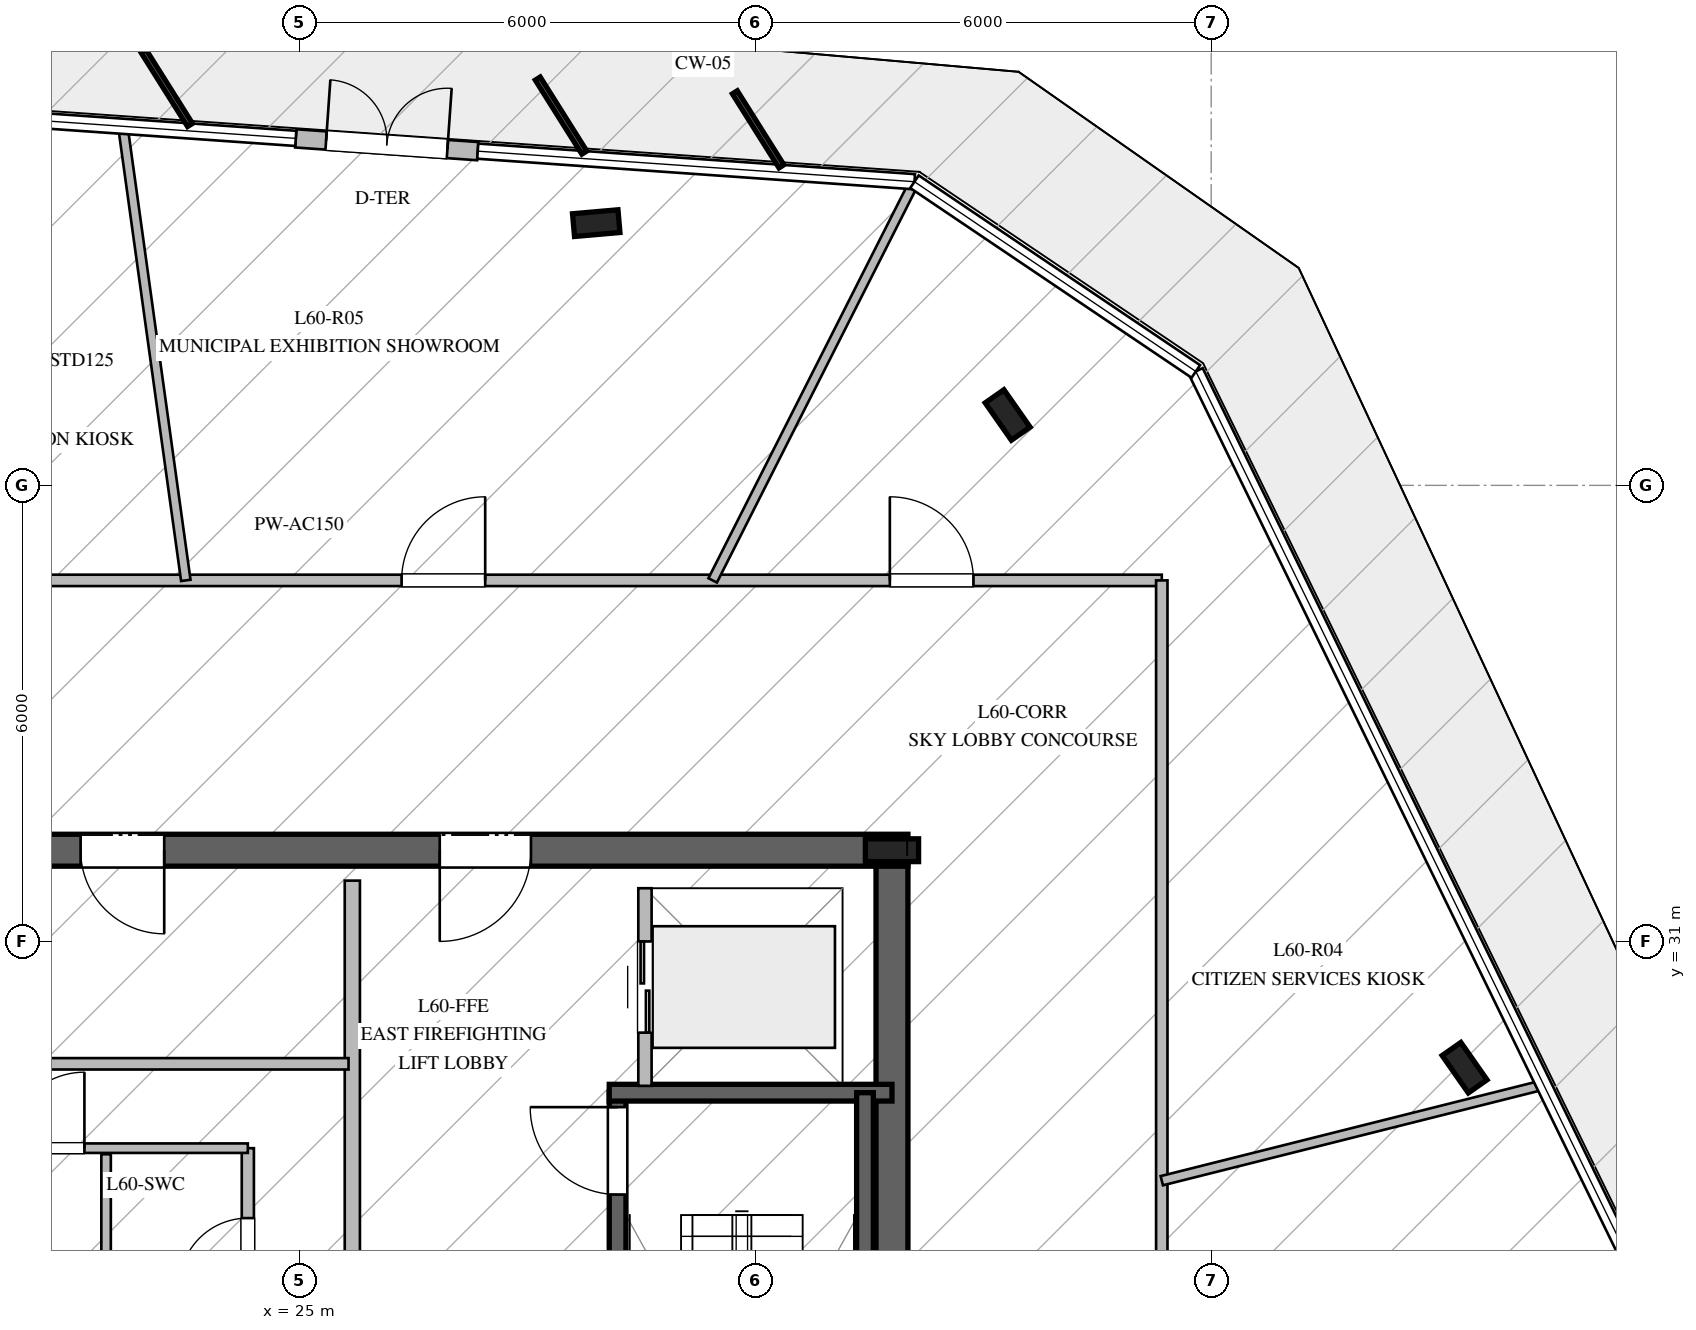
"""IFC4 building model, lengths in metres.
Left out: names, types, materials, properties, quantities, classifications, styles, units other than length and angle.
Written with IfcOpenShell. Run it as: python <this file> out.ifc"""

import sys

from ifc_helpers import new_model, si_unit, direction, frame, frame_2d, origin, origin_2d, place, context, subcontext, project, spatial, rectangle, i_section, extrude, element, fill, save


model = new_model("IFC4")
c1 = context("Model", 3, precision=1e-05, world=origin(), true_north=direction((0.0, 1.0)))
c2 = subcontext(c1, "Body", "Model", "MODEL_VIEW")
j1 = project(units=[si_unit("LENGTHUNIT", "METRE"), si_unit("PLANEANGLEUNIT", "RADIAN")], contexts=[c1])
p1 = place(None, origin())
s1 = spatial("IfcSite", under=j1, at=p1, CompositionType="ELEMENT")
p2 = place(p1, origin())
s2 = spatial("IfcBuilding", under=s1, at=p2, CompositionType="ELEMENT")
p3 = place(p2, frame((0.0, 0.0, 250.2)))
s3 = spatial("IfcBuildingStorey", under=s2, at=p3, CompositionType="ELEMENT", Elevation=250.2)
p4 = place(p3, frame((33.01, 32.2, 0.0), z_axis=(0.0, 0.0, 1.0), x_axis=(-1.0, 0.0, 0.0)))
e1 = element("IfcWall", 1, at=p4, inside=s3, PredefinedType="SHEAR", context=c2, shape_type="SweptSolid", body=[
    extrude(rectangle(XDim=16.02, YDim=0.42, at=frame_2d((8.01, 0.0))), origin(), (0.0, 0.0, 1.0), 3.78),
])
p5 = place(p4, frame((4.96, 0.0, 0.0)))
e2 = element("IfcOpeningElement", 2, at=p5, cuts=e1, PredefinedType="OPENING", context=c2, shape_type="SweptSolid", body=[
    extrude(rectangle(XDim=1.2, YDim=2.25, at=frame_2d((0.6, 1.125))), frame((0.0, 0.22, 0.0), z_axis=(0.0, -1.0, 0.0), x_axis=(1.0, 0.0, 0.0)), (0.0, 0.0, 1.0), 0.44),
])
p6 = place(p4, frame((9.785, 0.0, 0.0)))
e3 = element("IfcOpeningElement", 3, at=p6, cuts=e1, PredefinedType="OPENING", context=c2, shape_type="SweptSolid", body=[
    extrude(rectangle(XDim=1.1, YDim=2.2, at=frame_2d((0.55, 1.1))), frame((0.0, 0.22, 0.0), z_axis=(0.0, -1.0, 0.0), x_axis=(1.0, 0.0, 0.0)), (0.0, 0.0, 1.0), 0.44),
])
p7 = place(p3, frame((32.8, 18.01, 0.0), z_axis=(0.0, 0.0, 1.0), x_axis=(0.0, 1.0, 0.0)))
e4 = element("IfcWall", 4, at=p7, inside=s3, PredefinedType="SHEAR", context=c2, shape_type="SweptSolid", body=[
    extrude(rectangle(XDim=13.98, YDim=0.42, at=frame_2d((6.99, 0.0))), origin(), (0.0, 0.0, 1.0), 3.78),
])
p8 = place(p3, frame((32.8, 32.2, 0.0), z_axis=(0.0, 0.0, 1.0), x_axis=(1.0, 0.0, 0.0)))
e5 = element("IfcColumn", 5, at=p8, inside=s3, PredefinedType="COLUMN", context=c2, shape_type="SweptSolid", body=[
    extrude(i_section(OverallWidth=0.3, OverallDepth=0.7, WebThickness=0.017, FlangeThickness=0.032, at=origin_2d()), origin(), (0.0, 0.0, 1.0), 4.0),
])
p9 = place(p3, frame((29.19, 21.79, 0.0), z_axis=(0.0, 0.0, 1.0), x_axis=(0.0, 1.0, 0.0)))
e6 = element("IfcWall", 6, at=p9, inside=s3, PredefinedType="SOLIDWALL", context=c2, shape_type="SweptSolid", body=[
    extrude(rectangle(XDim=7.22, YDim=0.22, at=frame_2d((3.61, 0.0))), origin(), (0.0, 0.0, 1.0), 3.78),
])
p10 = place(p9, frame((5.88, 0.0, 0.0)))
e7 = element("IfcOpeningElement", 7, at=p10, cuts=e6, PredefinedType="OPENING", context=c2, shape_type="SweptSolid", body=[
    extrude(rectangle(XDim=1.15, YDim=2.2, at=frame_2d((0.575, 1.1))), frame((0.0, 0.12, 0.0), z_axis=(0.0, -1.0, 0.0), x_axis=(1.0, 0.0, 0.0)), (0.0, 0.0, 1.0), 0.24),
])
p11 = place(p3, frame((29.08, 29.01, 0.0), z_axis=(0.0, 0.0, 1.0), x_axis=(1.0, 0.0, 0.0)))
e8 = element("IfcWall", 8, at=p11, inside=s3, PredefinedType="SOLIDWALL", context=c2, shape_type="SweptSolid", body=[
    extrude(rectangle(XDim=3.72, YDim=0.22, at=frame_2d((1.86, 0.0))), origin(), (0.0, 0.0, 1.0), 3.78),
])
p12 = place(p3, frame((32.445, 29.01, 0.0), z_axis=(0.0, 0.0, 1.0), x_axis=(0.0, -1.0, 0.0)))
e9 = element("IfcWall", 9, at=p12, inside=s3, PredefinedType="SOLIDWALL", context=c2, shape_type="SweptSolid", body=[
    extrude(rectangle(XDim=7.22, YDim=0.22, at=frame_2d((3.61, 0.0))), origin(), (0.0, 0.0, 1.0), 3.78),
])
for number, where, z_axis, x_axis in (
    (10, (28.909, 40.45, -0.27), (0.0, 0.0, 1.0), (0.996, 0.087, 0.0)),
    (11, (40.334, 29.339, -0.27), (0.0, 0.0, 1.0), (-0.574, 0.819, 0.0)),
    (12, (34.322, 37.926, -0.27), (0.0, 0.0, 1.0), (-0.574, 0.819, 0.0)),
):
    element("IfcColumn", number, at=place(p3, frame(where, z_axis=z_axis, x_axis=x_axis)), inside=s3, PredefinedType="COLUMN", context=c2, shape_type="SweptSolid", body=[
        extrude(i_section(OverallWidth=0.3, OverallDepth=0.6, WebThickness=0.015, FlangeThickness=0.03, at=origin_2d()), origin(), (0.0, 0.0, 1.0), 4.27),
    ])
p13 = place(p3, frame((27.35, 41.397, 0.0), z_axis=(0.0, 0.0, 1.0), x_axis=(-0.99754775803, 0.069989073784, 0.0)))
e13 = element("IfcWall", 13, at=p13, inside=s3, PredefinedType="STANDARD", context=c2, shape_type="SweptSolid", body=[
    extrude(rectangle(XDim=2.4, YDim=0.24, at=frame_2d((1.2, 0.0))), origin(), (0.0, 0.0, 1.0), 3.78),
])
p14 = place(p13, frame((0.4, 0.0, 0.0)))
e14 = element("IfcOpeningElement", 14, at=p14, cuts=e13, PredefinedType="OPENING", context=c2, shape_type="SweptSolid", body=[
    extrude(rectangle(XDim=1.6, YDim=2.25, at=frame_2d((0.8, 1.125))), frame((0.0, 0.13, 0.0), z_axis=(0.0, -1.0, 0.0), x_axis=(1.0, 0.0, 0.0)), (0.0, 0.0, 1.0), 0.26),
])
p15 = place(p3, frame((25.7, 26.65, 0.0), z_axis=(0.0, 0.0, 1.0), x_axis=(0.0, 1.0, 0.0)))
e15 = element("IfcWall", 15, at=p15, inside=s3, PredefinedType="PARTITIONING", context=c2, shape_type="SweptSolid", body=[
    extrude(rectangle(XDim=5.15, YDim=0.2, at=frame_2d((2.575, 0.0))), origin(), (0.0, 0.0, 1.0), 3.78),
])
p16 = place(p3, frame((24.325, 23.35, 0.0), z_axis=(0.0, 0.0, 1.0), x_axis=(0.0, 1.0, 0.0)))
e16 = element("IfcWall", 16, at=p16, inside=s3, PredefinedType="PLUMBINGWALL", context=c2, shape_type="SweptSolid", body=[
    extrude(rectangle(XDim=4.93, YDim=0.16, at=frame_2d((2.465, 0.0))), origin(), (0.0, 0.0, 1.0), 3.78),
])
p17 = place(p16, frame((0.65, 0.0, 0.0)))
e17 = element("IfcOpeningElement", 17, at=p17, cuts=e16, PredefinedType="OPENING", context=c2, shape_type="SweptSolid", body=[
    extrude(rectangle(XDim=0.95, YDim=2.1, at=frame_2d((0.475, 1.05))), frame((0.0, 0.09, 0.0), z_axis=(0.0, -1.0, 0.0), x_axis=(1.0, 0.0, 0.0)), (0.0, 0.0, 1.0), 0.18),
])
p18 = place(p16, frame((3.11, 0.0, 0.0)))
e18 = element("IfcOpeningElement", 18, at=p18, cuts=e16, PredefinedType="OPENING", context=c2, shape_type="SweptSolid", body=[
    extrude(rectangle(XDim=0.9, YDim=2.1, at=frame_2d((0.45, 1.05))), frame((0.0, 0.09, 0.0), z_axis=(0.0, -1.0, 0.0), x_axis=(1.0, 0.0, 0.0)), (0.0, 0.0, 1.0), 0.18),
])
p19 = place(p3, frame((20.92, 28.28, 0.0), z_axis=(0.0, 0.0, 1.0), x_axis=(1.0, 0.0, 0.0)))
e19 = element("IfcWall", 19, at=p19, inside=s3, PredefinedType="PARTITIONING", context=c2, shape_type="SweptSolid", body=[
    extrude(rectangle(XDim=3.405, YDim=0.125, at=frame_2d((1.703, 0.0))), origin(), (0.0, 0.0, 1.0), 3.78),
])
p20 = place(p19, frame((0.255, 0.0, 0.0)))
e20 = element("IfcOpeningElement", 20, at=p20, cuts=e19, PredefinedType="OPENING", context=c2, shape_type="SweptSolid", body=[
    extrude(rectangle(XDim=1.0, YDim=2.15, at=frame_2d((0.5, 1.075))), frame((0.0, 0.073, 0.0), z_axis=(0.0, -1.0, 0.0), x_axis=(1.0, 0.0, 0.0)), (0.0, 0.0, 1.0), 0.145),
])
p21 = place(p3, frame((22.46, 25.62, 0.0), z_axis=(0.0, 0.0, 1.0), x_axis=(0.0, 1.0, 0.0)))
e21 = element("IfcWall", 21, at=p21, inside=s3, PredefinedType="PARTITIONING", context=c2, shape_type="SweptSolid", body=[
    extrude(rectangle(XDim=2.58, YDim=0.125, at=frame_2d((1.29, 0.0))), origin(), (0.0, 0.0, 1.0), 3.78),
])
p22 = place(p3, frame((19.75, 29.39, 0.0), z_axis=(0.0, 0.0, 1.0), x_axis=(1.0, 0.0, 0.0)))
e22 = element("IfcWall", 22, at=p22, inside=s3, PredefinedType="PARTITIONING", context=c2, shape_type="SweptSolid", body=[
    extrude(rectangle(XDim=5.9, YDim=0.15, at=frame_2d((2.95, 0.0))), origin(), (0.0, 0.0, 1.0), 3.78),
])
p23 = place(p3, frame((29.55, 29.1, 0.0), z_axis=(0.0, 0.0, 1.0), x_axis=(0.0, 1.0, 0.0)))
e23 = element("IfcWall", 23, at=p23, inside=s3, PredefinedType="PARTITIONING", context=c2, shape_type="SweptSolid", body=[
    extrude(rectangle(XDim=2.6, YDim=0.175, at=frame_2d((1.3, 0.0))), origin(), (0.0, 0.0, 1.0), 3.78),
])
p24 = place(p23, frame((0.7, 0.0, 0.0)))
e24 = element("IfcOpeningElement", 24, at=p24, cuts=e23, PredefinedType="OPENING", context=c2, shape_type="SweptSolid", body=[
    extrude(rectangle(XDim=1.2, YDim=2.2, at=frame_2d((0.6, 1.1))), frame((0.0, 0.098, 0.0), z_axis=(0.0, -1.0, 0.0), x_axis=(1.0, 0.0, 0.0)), (0.0, 0.0, 1.0), 0.195),
])
p25 = place(p3, frame((13.65, 35.75, 0.0), z_axis=(0.0, 0.0, 1.0), x_axis=(1.0, 0.0, 0.0)))
e25 = element("IfcWall", 25, at=p25, inside=s3, PredefinedType="PARTITIONING", context=c2, shape_type="SweptSolid", body=[
    extrude(rectangle(XDim=22.7, YDim=0.15, at=frame_2d((11.35, 0.0))), origin(), (0.0, 0.0, 1.0), 3.28),
])
p26 = place(p25, frame((19.122, 0.0, 0.0)))
e26 = element("IfcOpeningElement", 26, at=p26, cuts=e25, PredefinedType="OPENING", context=c2, shape_type="SweptSolid", body=[
    extrude(rectangle(XDim=1.1, YDim=2.2, at=frame_2d((0.55, 1.1))), frame((0.0, 0.085, 0.0), z_axis=(0.0, -1.0, 0.0), x_axis=(1.0, 0.0, 0.0)), (0.0, 0.0, 1.0), 0.17),
])
p27 = place(p25, frame((12.698, 0.0, 0.0)))
e27 = element("IfcOpeningElement", 27, at=p27, cuts=e25, PredefinedType="OPENING", context=c2, shape_type="SweptSolid", body=[
    extrude(rectangle(XDim=1.1, YDim=2.2, at=frame_2d((0.55, 1.1))), frame((0.0, 0.085, 0.0), z_axis=(0.0, -1.0, 0.0), x_axis=(1.0, 0.0, 0.0)), (0.0, 0.0, 1.0), 0.17),
])
p28 = place(p25, frame((4.469, 0.0, 0.0)))
e28 = element("IfcOpeningElement", 28, at=p28, cuts=e25, PredefinedType="OPENING", context=c2, shape_type="SweptSolid", body=[
    extrude(rectangle(XDim=1.1, YDim=2.2, at=frame_2d((0.55, 1.1))), frame((0.0, 0.085, 0.0), z_axis=(0.0, -1.0, 0.0), x_axis=(1.0, 0.0, 0.0)), (0.0, 0.0, 1.0), 0.17),
])
p29 = place(p3, frame((36.35, 35.75, 0.0), z_axis=(0.0, 0.0, 1.0), x_axis=(0.0, -1.0, 0.0)))
e29 = element("IfcWall", 29, at=p29, inside=s3, PredefinedType="PARTITIONING", context=c2, shape_type="SweptSolid", body=[
    extrude(rectangle(XDim=21.5, YDim=0.15, at=frame_2d((10.75, 0.0))), origin(), (0.0, 0.0, 1.0), 3.25),
])
p30 = place(p29, frame((13.919, 0.0, 0.0)))
e30 = element("IfcOpeningElement", 30, at=p30, cuts=e29, PredefinedType="OPENING", context=c2, shape_type="SweptSolid", body=[
    extrude(rectangle(XDim=1.1, YDim=2.2, at=frame_2d((0.55, 1.1))), frame((0.0, 0.085, 0.0), z_axis=(0.0, -1.0, 0.0), x_axis=(1.0, 0.0, 0.0)), (0.0, 0.0, 1.0), 0.17),
])
p31 = place(p3, frame((23.509, 35.75, 0.0), z_axis=(0.0, 0.0, 1.0), x_axis=(-0.137333830572, 0.990524819972, 0.0)))
e31 = element("IfcWall", 31, at=p31, inside=s3, PredefinedType="PARTITIONING", context=c2, shape_type="SweptSolid", body=[
    extrude(rectangle(XDim=6.014, YDim=0.125, at=frame_2d((3.007, 0.0))), origin(), (0.0, 0.0, 1.0), 3.28),
])
p32 = place(p3, frame((36.35, 27.852, 0.0), z_axis=(0.0, 0.0, 1.0), x_axis=(0.969874952969, 0.243603316078, 0.0)))
e32 = element("IfcWall", 32, at=p32, inside=s3, PredefinedType="PARTITIONING", context=c2, shape_type="SweptSolid", body=[
    extrude(rectangle(XDim=5.164, YDim=0.125, at=frame_2d((2.582, 0.0))), origin(), (0.0, 0.0, 1.0), 3.28),
])
p33 = place(p3, frame((30.441, 35.75, 0.0), z_axis=(0.0, 0.0, 1.0), x_axis=(0.451573228001, 0.892234061081, 0.0)))
e33 = element("IfcWall", 33, at=p33, inside=s3, PredefinedType="PARTITIONING", context=c2, shape_type="SweptSolid", body=[
    extrude(rectangle(XDim=5.862, YDim=0.125, at=frame_2d((2.931, 0.0))), origin(), (0.0, 0.0, 1.0), 3.28),
])
p34 = place(p14, frame((1.6, 0.0, 0.0), z_axis=(0.0, 0.0, 1.0), x_axis=(-1.0, 0.0, 0.0)))
e34 = element("IfcDoor", 34, at=p34, inside=s3, OperationType="DOUBLE_DOOR_SINGLE_SWING", PredefinedType="DOOR", context=c2, shape_type="SweptSolid", body=[
    extrude(rectangle(XDim=1.6, YDim=2.25, at=frame_2d((0.8, 1.125))), frame((0.0, 0.025, 0.0), z_axis=(0.0, -1.0, 0.0), x_axis=(1.0, 0.0, 0.0)), (0.0, 0.0, 1.0), 0.05),
])
fill(e14, e34)
p35 = place(p10, origin())
e35 = element("IfcDoor", 35, at=p35, inside=s3, OperationType="SINGLE_SWING_RIGHT", PredefinedType="DOOR", context=c2, shape_type="SweptSolid", body=[
    extrude(rectangle(XDim=1.15, YDim=2.2, at=frame_2d((0.575, 1.1))), frame((0.0, 0.025, 0.0), z_axis=(0.0, -1.0, 0.0), x_axis=(1.0, 0.0, 0.0)), (0.0, 0.0, 1.0), 0.05),
])
fill(e7, e35)
p36 = place(p5, origin())
e36 = element("IfcDoor", 36, at=p36, inside=s3, OperationType="SINGLE_SWING_RIGHT", PredefinedType="DOOR", context=c2, shape_type="SweptSolid", body=[
    extrude(rectangle(XDim=1.2, YDim=2.25, at=frame_2d((0.6, 1.125))), frame((0.0, 0.025, 0.0), z_axis=(0.0, -1.0, 0.0), x_axis=(1.0, 0.0, 0.0)), (0.0, 0.0, 1.0), 0.05),
])
fill(e2, e36)
p37 = place(p20, origin())
e37 = element("IfcDoor", 37, at=p37, inside=s3, OperationType="SINGLE_SWING_RIGHT", PredefinedType="DOOR", context=c2, shape_type="SweptSolid", body=[
    extrude(rectangle(XDim=1.0, YDim=2.15, at=frame_2d((0.5, 1.075))), frame((0.0, 0.025, 0.0), z_axis=(0.0, -1.0, 0.0), x_axis=(1.0, 0.0, 0.0)), (0.0, 0.0, 1.0), 0.05),
])
fill(e20, e37)
p38 = place(p18, origin())
e38 = element("IfcDoor", 38, at=p38, inside=s3, OperationType="SINGLE_SWING_LEFT", PredefinedType="DOOR", context=c2, shape_type="SweptSolid", body=[
    extrude(rectangle(XDim=0.9, YDim=2.1, at=frame_2d((0.45, 1.05))), frame((0.0, 0.025, 0.0), z_axis=(0.0, -1.0, 0.0), x_axis=(1.0, 0.0, 0.0)), (0.0, 0.0, 1.0), 0.05),
])
fill(e18, e38)
p39 = place(p6, origin())
e39 = element("IfcDoor", 39, at=p39, inside=s3, OperationType="SINGLE_SWING_LEFT", PredefinedType="DOOR", context=c2, shape_type="SweptSolid", body=[
    extrude(rectangle(XDim=1.1, YDim=2.2, at=frame_2d((0.55, 1.1))), frame((0.0, 0.025, 0.0), z_axis=(0.0, -1.0, 0.0), x_axis=(1.0, 0.0, 0.0)), (0.0, 0.0, 1.0), 0.05),
])
fill(e3, e39)
p40 = place(p24, origin())
e40 = element("IfcDoor", 40, at=p40, inside=s3, OperationType="DOUBLE_DOOR_SLIDING", PredefinedType="DOOR", context=c2, shape_type="SweptSolid", body=[
    extrude(rectangle(XDim=1.2, YDim=2.2, at=frame_2d((0.6, 1.1))), frame((0.0, 0.025, 0.0), z_axis=(0.0, -1.0, 0.0), x_axis=(1.0, 0.0, 0.0)), (0.0, 0.0, 1.0), 0.05),
])
fill(e24, e40)
p41 = place(p26, origin())
e41 = element("IfcDoor", 41, at=p41, inside=s3, OperationType="SINGLE_SWING_LEFT", PredefinedType="DOOR", context=c2, shape_type="SweptSolid", body=[
    extrude(rectangle(XDim=1.1, YDim=2.2, at=frame_2d((0.55, 1.1))), frame((0.0, 0.025, 0.0), z_axis=(0.0, -1.0, 0.0), x_axis=(1.0, 0.0, 0.0)), (0.0, 0.0, 1.0), 0.05),
])
fill(e26, e41)
p42 = place(p27, origin())
e42 = element("IfcDoor", 42, at=p42, inside=s3, OperationType="SINGLE_SWING_RIGHT", PredefinedType="DOOR", context=c2, shape_type="SweptSolid", body=[
    extrude(rectangle(XDim=1.1, YDim=2.2, at=frame_2d((0.55, 1.1))), frame((0.0, 0.025, 0.0), z_axis=(0.0, -1.0, 0.0), x_axis=(1.0, 0.0, 0.0)), (0.0, 0.0, 1.0), 0.05),
])
fill(e27, e42)
save(model, sys.argv[1])
